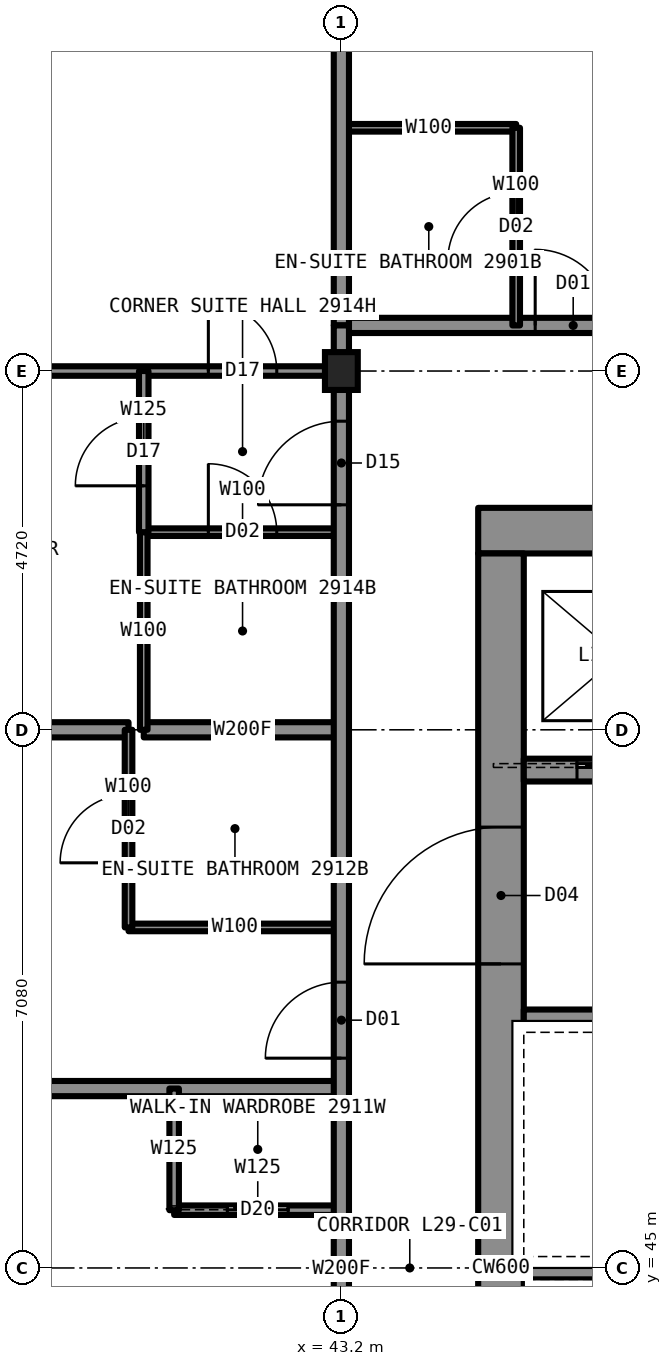
"""IFC4 building model, lengths in metres.
Left out: names, types, materials, properties, quantities, classifications, styles, units other than length and angle.
Written with IfcOpenShell. Run it as: python <this file> out.ifc"""

import sys

from ifc_helpers import new_model, si_unit, direction, frame, frame_2d, origin, origin_2d, place, context, subcontext, project, spatial, rectangle, i_section, extrude, element, fill, save


model = new_model("IFC4")
c1 = context("Model", 3, precision=1e-05, world=origin(), true_north=direction((0.0, 1.0)))
c2 = subcontext(c1, "Body", "Model", "MODEL_VIEW")
j1 = project(units=[si_unit("LENGTHUNIT", "METRE"), si_unit("PLANEANGLEUNIT", "RADIAN")], contexts=[c1])
p1 = place(None, origin())
s1 = spatial("IfcSite", under=j1, at=p1, CompositionType="ELEMENT")
p2 = place(p1, origin())
s2 = spatial("IfcBuilding", under=s1, at=p2, CompositionType="ELEMENT")
p3 = place(p2, frame((0.0, 0.0, 103.9)))
s3 = spatial("IfcBuildingStorey", under=s2, at=p3, CompositionType="ELEMENT", Elevation=103.9)
p4 = place(p3, frame((43.2, 56.8, 0.0), z_axis=(0.0, 0.0, 1.0), x_axis=(1.0, 0.0, 0.0)))
e1 = element("IfcColumn", 1, at=p4, inside=s3, PredefinedType="COLUMN", context=c2, shape_type="SweptSolid", body=[
    extrude(i_section(OverallWidth=0.432, OverallDepth=0.498, WebThickness=0.056, FlangeThickness=0.089, at=origin_2d()), origin(), (0.0, 0.0, 1.0), 3.5),
])
p5 = place(p3, frame((45.0, 54.7, 0.0), z_axis=(0.0, 0.0, 1.0), x_axis=(1.0, 0.0, 0.0)))
e2 = element("IfcWall", 2, at=p5, inside=s3, PredefinedType="SHEAR", context=c2, shape_type="SweptSolid", body=[
    extrude(rectangle(XDim=20.0, YDim=0.6, at=frame_2d((10.0, 0.0))), origin(), (0.0, 0.0, 1.0), 3.5),
])
p6 = place(p3, frame((45.3, 35.6, 0.0), z_axis=(0.0, 0.0, 1.0), x_axis=(0.0, 1.0, 0.0)))
e3 = element("IfcWall", 3, at=p6, inside=s3, PredefinedType="SHEAR", context=c2, shape_type="SweptSolid", body=[
    extrude(rectangle(XDim=18.8, YDim=0.6, at=frame_2d((9.4, 0.0))), origin(), (0.0, 0.0, 1.0), 3.5),
])
p7 = place(p6, frame((13.4, 0.0, 0.0)))
e4 = element("IfcOpeningElement", 4, at=p7, cuts=e3, PredefinedType="OPENING", context=c2, shape_type="SweptSolid", body=[
    extrude(rectangle(XDim=1.8, YDim=2.2, at=frame_2d((0.9, 1.1))), frame((0.0, 0.31, 0.0), z_axis=(0.0, -1.0, 0.0), x_axis=(1.0, 0.0, 0.0)), (0.0, 0.0, 1.0), 0.62),
])
p8 = place(p6, frame((3.6, 0.0, 0.0)))
e5 = element("IfcOpeningElement", 5, at=p8, cuts=e3, PredefinedType="OPENING", context=c2, shape_type="SweptSolid", body=[
    extrude(rectangle(XDim=1.8, YDim=2.2, at=frame_2d((0.9, 1.1))), frame((0.0, 0.31, 0.0), z_axis=(0.0, -1.0, 0.0), x_axis=(1.0, 0.0, 0.0)), (0.0, 0.0, 1.0), 0.62),
])
p9 = place(p6, frame((6.4, 0.0, 0.0)))
e6 = element("IfcOpeningElement", 6, at=p9, cuts=e3, PredefinedType="OPENING", context=c2, shape_type="SweptSolid", body=[
    extrude(rectangle(XDim=1.2, YDim=2.2, at=frame_2d((0.6, 1.1))), frame((0.0, 0.31, 0.0), z_axis=(0.0, -1.0, 0.0), x_axis=(1.0, 0.0, 0.0)), (0.0, 0.0, 1.0), 0.62),
])
p10 = place(p3, frame((45.6, 51.55, 0.0), z_axis=(0.0, 0.0, 1.0), x_axis=(1.0, 0.0, 0.0)))
e7 = element("IfcWall", 7, at=p10, inside=s3, PredefinedType="SHEAR", context=c2, shape_type="SweptSolid", body=[
    extrude(rectangle(XDim=18.8, YDim=0.3, at=frame_2d((9.4, 0.0))), origin(), (0.0, 0.0, 1.0), 3.5),
])
p11 = place(p10, frame((0.7, 0.0, 0.0)))
e8 = element("IfcOpeningElement", 8, at=p11, cuts=e7, PredefinedType="OPENING", context=c2, shape_type="SweptSolid", body=[
    extrude(rectangle(XDim=1.1, YDim=2.2, at=frame_2d((0.55, 1.1))), frame((0.0, 0.16, 0.0), z_axis=(0.0, -1.0, 0.0), x_axis=(1.0, 0.0, 0.0)), (0.0, 0.0, 1.0), 0.32),
])
p12 = place(p10, frame((3.4, 0.0, 0.0)))
e9 = element("IfcOpeningElement", 9, at=p12, cuts=e7, PredefinedType="OPENING", context=c2, shape_type="SweptSolid", body=[
    extrude(rectangle(XDim=1.1, YDim=2.2, at=frame_2d((0.55, 1.1))), frame((0.0, 0.16, 0.0), z_axis=(0.0, -1.0, 0.0), x_axis=(1.0, 0.0, 0.0)), (0.0, 0.0, 1.0), 0.32),
])
p13 = place(p10, frame((6.1, 0.0, 0.0)))
e10 = element("IfcOpeningElement", 10, at=p13, cuts=e7, PredefinedType="OPENING", context=c2, shape_type="SweptSolid", body=[
    extrude(rectangle(XDim=1.1, YDim=2.2, at=frame_2d((0.55, 1.1))), frame((0.0, 0.16, 0.0), z_axis=(0.0, -1.0, 0.0), x_axis=(1.0, 0.0, 0.0)), (0.0, 0.0, 1.0), 0.32),
])
p14 = place(p10, frame((8.8, 0.0, 0.0)))
e11 = element("IfcOpeningElement", 11, at=p14, cuts=e7, PredefinedType="OPENING", context=c2, shape_type="SweptSolid", body=[
    extrude(rectangle(XDim=1.1, YDim=2.2, at=frame_2d((0.55, 1.1))), frame((0.0, 0.16, 0.0), z_axis=(0.0, -1.0, 0.0), x_axis=(1.0, 0.0, 0.0)), (0.0, 0.0, 1.0), 0.32),
])
p15 = place(p10, frame((11.6, 0.0, 0.0)))
e12 = element("IfcOpeningElement", 12, at=p15, cuts=e7, PredefinedType="OPENING", context=c2, shape_type="SweptSolid", body=[
    extrude(rectangle(XDim=1.1, YDim=2.2, at=frame_2d((0.55, 1.1))), frame((0.0, 0.16, 0.0), z_axis=(0.0, -1.0, 0.0), x_axis=(1.0, 0.0, 0.0)), (0.0, 0.0, 1.0), 0.32),
])
p16 = place(p10, frame((14.3, 0.0, 0.0)))
e13 = element("IfcOpeningElement", 13, at=p16, cuts=e7, PredefinedType="OPENING", context=c2, shape_type="SweptSolid", body=[
    extrude(rectangle(XDim=1.1, YDim=2.2, at=frame_2d((0.55, 1.1))), frame((0.0, 0.16, 0.0), z_axis=(0.0, -1.0, 0.0), x_axis=(1.0, 0.0, 0.0)), (0.0, 0.0, 1.0), 0.32),
])
p17 = place(p3, frame((45.6, 48.25, 0.0), z_axis=(0.0, 0.0, 1.0), x_axis=(1.0, 0.0, 0.0)))
e14 = element("IfcWall", 14, at=p17, inside=s3, PredefinedType="SHEAR", context=c2, shape_type="SweptSolid", body=[
    extrude(rectangle(XDim=7.1, YDim=0.3, at=frame_2d((3.55, 0.0))), origin(), (0.0, 0.0, 1.0), 3.5),
])
p18 = place(p3, frame((45.6, 45.0, 0.0), z_axis=(0.0, 0.0, 1.0), x_axis=(1.0, 0.0, 0.0)))
e15 = element("IfcWall", 15, at=p18, inside=s3, PredefinedType="SHEAR", context=c2, shape_type="SweptSolid", body=[
    extrude(rectangle(XDim=6.8, YDim=0.3, at=frame_2d((3.4, 0.0))), origin(), (0.0, 0.0, 1.0), 3.5),
])
p19 = place(p3, frame((41.0, 45.76, 0.0), z_axis=(0.0, 0.0, 1.0), x_axis=(1.0, 0.0, 0.0)))
e16 = element("IfcWall", 16, at=p19, inside=s3, PredefinedType="PARTITIONING", context=c2, shape_type="SweptSolid", body=[
    extrude(rectangle(XDim=2.2, YDim=0.125, at=frame_2d((1.1, 0.0))), origin(), (0.0, 0.0, 1.0), 3.33),
])
p20 = place(p19, frame((0.7, 0.0, 0.0)))
e17 = element("IfcOpeningElement", 17, at=p20, cuts=e16, PredefinedType="OPENING", context=c2, shape_type="SweptSolid", body=[
    extrude(rectangle(XDim=0.8, YDim=2.1, at=frame_2d((0.4, 1.05))), frame((0.0, 0.073, 0.0), z_axis=(0.0, -1.0, 0.0), x_axis=(1.0, 0.0, 0.0)), (0.0, 0.0, 1.0), 0.145),
])
p21 = place(p3, frame((34.7, 56.8, 0.0), z_axis=(0.0, 0.0, 1.0), x_axis=(1.0, 0.0, 0.0)))
e18 = element("IfcWall", 18, at=p21, inside=s3, PredefinedType="PARTITIONING", context=c2, shape_type="SweptSolid", body=[
    extrude(rectangle(XDim=8.5, YDim=0.125, at=frame_2d((4.25, 0.0))), origin(), (0.0, 0.0, 1.0), 2.573),
])
p22 = place(p21, frame((6.75, 0.0, 0.0)))
e19 = element("IfcOpeningElement", 19, at=p22, cuts=e18, PredefinedType="OPENING", context=c2, shape_type="SweptSolid", body=[
    extrude(rectangle(XDim=0.9, YDim=2.2, at=frame_2d((0.45, 1.1))), frame((0.0, 0.073, 0.0), z_axis=(0.0, -1.0, 0.0), x_axis=(1.0, 0.0, 0.0)), (0.0, 0.0, 1.0), 0.145),
])
p23 = place(p3, frame((43.2, 57.4, 0.0), z_axis=(0.0, 0.0, 1.0), x_axis=(1.0, 0.0, 0.0)))
e20 = element("IfcWall", 20, at=p23, inside=s3, PredefinedType="PARTITIONING", context=c2, shape_type="SweptSolid", body=[
    extrude(rectangle(XDim=23.6, YDim=0.2, at=frame_2d((11.8, 0.0))), origin(), (0.0, 0.0, 1.0), 3.33),
])
p24 = place(p23, frame((2.55, 0.0, 0.0)))
e21 = element("IfcOpeningElement", 21, at=p24, cuts=e20, PredefinedType="OPENING", context=c2, shape_type="SweptSolid", body=[
    extrude(rectangle(XDim=1.0, YDim=2.2, at=frame_2d((0.5, 1.1))), frame((0.0, 0.11, 0.0), z_axis=(0.0, -1.0, 0.0), x_axis=(1.0, 0.0, 0.0)), (0.0, 0.0, 1.0), 0.22),
])
p25 = place(p23, frame((7.72, 0.0, 0.0)))
e22 = element("IfcOpeningElement", 22, at=p25, cuts=e20, PredefinedType="OPENING", context=c2, shape_type="SweptSolid", body=[
    extrude(rectangle(XDim=1.0, YDim=2.2, at=frame_2d((0.5, 1.1))), frame((0.0, 0.11, 0.0), z_axis=(0.0, -1.0, 0.0), x_axis=(1.0, 0.0, 0.0)), (0.0, 0.0, 1.0), 0.22),
])
p26 = place(p23, frame((14.56, 0.0, 0.0)))
e23 = element("IfcOpeningElement", 23, at=p26, cuts=e20, PredefinedType="OPENING", context=c2, shape_type="SweptSolid", body=[
    extrude(rectangle(XDim=1.0, YDim=2.2, at=frame_2d((0.5, 1.1))), frame((0.0, 0.11, 0.0), z_axis=(0.0, -1.0, 0.0), x_axis=(1.0, 0.0, 0.0)), (0.0, 0.0, 1.0), 0.22),
])
p27 = place(p23, frame((20.34, 0.0, 0.0)))
e24 = element("IfcOpeningElement", 24, at=p27, cuts=e20, PredefinedType="OPENING", context=c2, shape_type="SweptSolid", body=[
    extrude(rectangle(XDim=1.0, YDim=2.2, at=frame_2d((0.5, 1.1))), frame((0.0, 0.11, 0.0), z_axis=(0.0, -1.0, 0.0), x_axis=(1.0, 0.0, 0.0)), (0.0, 0.0, 1.0), 0.22),
])
p28 = place(p3, frame((43.2, 60.0, 0.0), z_axis=(0.0, 0.0, 1.0), x_axis=(1.0, 0.0, 0.0)))
e25 = element("IfcWall", 25, at=p28, inside=s3, PredefinedType="PARTITIONING", context=c2, shape_type="SweptSolid", body=[
    extrude(rectangle(XDim=2.3, YDim=0.1, at=frame_2d((1.15, 0.0))), origin(), (0.0, 0.0, 1.0), 2.731),
])
p29 = place(p3, frame((34.7, 47.36, 0.0), z_axis=(0.0, 0.0, 1.0), x_axis=(1.0, 0.0, 0.0)))
e26 = element("IfcWall", 26, at=p29, inside=s3, PredefinedType="PARTITIONING", context=c2, shape_type="SweptSolid", body=[
    extrude(rectangle(XDim=8.5, YDim=0.2, at=frame_2d((4.25, 0.0))), origin(), (0.0, 0.0, 1.0), 2.731),
])
p30 = place(p3, frame((40.4, 49.48, 0.0), z_axis=(0.0, 0.0, 1.0), x_axis=(1.0, 0.0, 0.0)))
e27 = element("IfcWall", 27, at=p30, inside=s3, PredefinedType="PARTITIONING", context=c2, shape_type="SweptSolid", body=[
    extrude(rectangle(XDim=2.8, YDim=0.1, at=frame_2d((1.4, 0.0))), origin(), (0.0, 0.0, 1.0), 3.33),
])
p31 = place(p3, frame((34.7, 52.08, 0.0), z_axis=(0.0, 0.0, 1.0), x_axis=(1.0, 0.0, 0.0)))
e28 = element("IfcWall", 28, at=p31, inside=s3, PredefinedType="PARTITIONING", context=c2, shape_type="SweptSolid", body=[
    extrude(rectangle(XDim=5.7, YDim=0.2, at=frame_2d((2.85, 0.0))), origin(), (0.0, 0.0, 1.0), 2.573),
])
p32 = place(p3, frame((40.6, 52.08, 0.0), z_axis=(0.0, 0.0, 1.0), x_axis=(1.0, 0.0, 0.0)))
e29 = element("IfcWall", 29, at=p32, inside=s3, PredefinedType="PARTITIONING", context=c2, shape_type="SweptSolid", body=[
    extrude(rectangle(XDim=2.6, YDim=0.2, at=frame_2d((1.3, 0.0))), origin(), (0.0, 0.0, 1.0), 2.573),
])
p33 = place(p3, frame((40.6, 54.68, 0.0), z_axis=(0.0, 0.0, 1.0), x_axis=(1.0, 0.0, 0.0)))
e30 = element("IfcWall", 30, at=p33, inside=s3, PredefinedType="PARTITIONING", context=c2, shape_type="SweptSolid", body=[
    extrude(rectangle(XDim=2.6, YDim=0.1, at=frame_2d((1.3, 0.0))), origin(), (0.0, 0.0, 1.0), 3.33),
])
p34 = place(p33, frame((0.85, 0.0, 0.0)))
e31 = element("IfcOpeningElement", 31, at=p34, cuts=e30, PredefinedType="OPENING", context=c2, shape_type="SweptSolid", body=[
    extrude(rectangle(XDim=0.9, YDim=2.1, at=frame_2d((0.45, 1.05))), frame((0.0, 0.06, 0.0), z_axis=(0.0, -1.0, 0.0), x_axis=(1.0, 0.0, 0.0)), (0.0, 0.0, 1.0), 0.12),
])
p35 = place(p3, frame((43.2, 33.2, 0.0), z_axis=(0.0, 0.0, 1.0), x_axis=(0.0, 1.0, 0.0)))
e32 = element("IfcWall", 32, at=p35, inside=s3, PredefinedType="PARTITIONING", context=c2, shape_type="SweptSolid", body=[
    extrude(rectangle(XDim=23.58, YDim=0.2, at=frame_2d((11.79, 0.0))), origin(), (0.0, 0.0, 1.0), 3.33),
])
p36 = place(p35, frame((7.72, 0.0, 0.0)))
e33 = element("IfcOpeningElement", 33, at=p36, cuts=e32, PredefinedType="OPENING", context=c2, shape_type="SweptSolid", body=[
    extrude(rectangle(XDim=1.0, YDim=2.2, at=frame_2d((0.5, 1.1))), frame((0.0, 0.11, 0.0), z_axis=(0.0, -1.0, 0.0), x_axis=(1.0, 0.0, 0.0)), (0.0, 0.0, 1.0), 0.22),
])
p37 = place(p35, frame((14.56, 0.0, 0.0)))
e34 = element("IfcOpeningElement", 34, at=p37, cuts=e32, PredefinedType="OPENING", context=c2, shape_type="SweptSolid", body=[
    extrude(rectangle(XDim=1.0, YDim=2.2, at=frame_2d((0.5, 1.1))), frame((0.0, 0.11, 0.0), z_axis=(0.0, -1.0, 0.0), x_axis=(1.0, 0.0, 0.0)), (0.0, 0.0, 1.0), 0.22),
])
p38 = place(p35, frame((21.84, 0.0, 0.0)))
e35 = element("IfcOpeningElement", 35, at=p38, cuts=e32, PredefinedType="OPENING", context=c2, shape_type="SweptSolid", body=[
    extrude(rectangle(XDim=1.1, YDim=2.2, at=frame_2d((0.55, 1.1))), frame((0.0, 0.11, 0.0), z_axis=(0.0, -1.0, 0.0), x_axis=(1.0, 0.0, 0.0)), (0.0, 0.0, 1.0), 0.22),
])
p39 = place(p35, frame((0.66, 0.0, 0.0)))
e36 = element("IfcOpeningElement", 36, at=p39, cuts=e32, PredefinedType="OPENING", context=c2, shape_type="SweptSolid", body=[
    extrude(rectangle(XDim=1.1, YDim=2.2, at=frame_2d((0.55, 1.1))), frame((0.0, 0.11, 0.0), z_axis=(0.0, -1.0, 0.0), x_axis=(1.0, 0.0, 0.0)), (0.0, 0.0, 1.0), 0.22),
])
p40 = place(p3, frame((43.2, 57.4, 0.0), z_axis=(0.0, 0.0, 1.0), x_axis=(0.0, 1.0, 0.0)))
e37 = element("IfcWall", 37, at=p40, inside=s3, PredefinedType="PARTITIONING", context=c2, shape_type="SweptSolid", body=[
    extrude(rectangle(XDim=7.9, YDim=0.2, at=frame_2d((3.95, 0.0))), origin(), (0.0, 0.0, 1.0), 2.573),
])
p41 = place(p3, frame((41.0, 45.76, 0.0), z_axis=(0.0, 0.0, 1.0), x_axis=(0.0, 1.0, 0.0)))
e38 = element("IfcWall", 38, at=p41, inside=s3, PredefinedType="PARTITIONING", context=c2, shape_type="SweptSolid", body=[
    extrude(rectangle(XDim=1.6, YDim=0.125, at=frame_2d((0.8, 0.0))), origin(), (0.0, 0.0, 1.0), 3.33),
])
p42 = place(p3, frame((40.6, 52.08, 0.0), z_axis=(0.0, 0.0, 1.0), x_axis=(0.0, 1.0, 0.0)))
e39 = element("IfcWall", 39, at=p42, inside=s3, PredefinedType="PARTITIONING", context=c2, shape_type="SweptSolid", body=[
    extrude(rectangle(XDim=2.6, YDim=0.1, at=frame_2d((1.3, 0.0))), origin(), (0.0, 0.0, 1.0), 3.33),
])
p43 = place(p3, frame((40.6, 54.68, 0.0), z_axis=(0.0, 0.0, 1.0), x_axis=(0.0, 1.0, 0.0)))
e40 = element("IfcWall", 40, at=p43, inside=s3, PredefinedType="PARTITIONING", context=c2, shape_type="SweptSolid", body=[
    extrude(rectangle(XDim=2.12, YDim=0.125, at=frame_2d((1.06, 0.0))), origin(), (0.0, 0.0, 1.0), 3.33),
])
p44 = place(p43, frame((0.61, 0.0, 0.0)))
e41 = element("IfcOpeningElement", 41, at=p44, cuts=e40, PredefinedType="OPENING", context=c2, shape_type="SweptSolid", body=[
    extrude(rectangle(XDim=0.9, YDim=2.2, at=frame_2d((0.45, 1.1))), frame((0.0, 0.073, 0.0), z_axis=(0.0, -1.0, 0.0), x_axis=(1.0, 0.0, 0.0)), (0.0, 0.0, 1.0), 0.145),
])
p45 = place(p3, frame((40.4, 49.48, 0.0), z_axis=(0.0, 0.0, 1.0), x_axis=(0.0, 1.0, 0.0)))
e42 = element("IfcWall", 42, at=p45, inside=s3, PredefinedType="PARTITIONING", context=c2, shape_type="SweptSolid", body=[
    extrude(rectangle(XDim=2.6, YDim=0.1, at=frame_2d((1.3, 0.0))), origin(), (0.0, 0.0, 1.0), 3.33),
])
p46 = place(p45, frame((0.85, 0.0, 0.0)))
e43 = element("IfcOpeningElement", 43, at=p46, cuts=e42, PredefinedType="OPENING", context=c2, shape_type="SweptSolid", body=[
    extrude(rectangle(XDim=0.9, YDim=2.1, at=frame_2d((0.45, 1.05))), frame((0.0, 0.06, 0.0), z_axis=(0.0, -1.0, 0.0), x_axis=(1.0, 0.0, 0.0)), (0.0, 0.0, 1.0), 0.12),
])
p47 = place(p3, frame((45.5, 57.4, 0.0), z_axis=(0.0, 0.0, 1.0), x_axis=(0.0, 1.0, 0.0)))
e44 = element("IfcWall", 44, at=p47, inside=s3, PredefinedType="PARTITIONING", context=c2, shape_type="SweptSolid", body=[
    extrude(rectangle(XDim=2.6, YDim=0.1, at=frame_2d((1.3, 0.0))), origin(), (0.0, 0.0, 1.0), 3.33),
])
p48 = place(p47, frame((0.85, 0.0, 0.0)))
e45 = element("IfcOpeningElement", 45, at=p48, cuts=e44, PredefinedType="OPENING", context=c2, shape_type="SweptSolid", body=[
    extrude(rectangle(XDim=0.9, YDim=2.1, at=frame_2d((0.45, 1.05))), frame((0.0, 0.06, 0.0), z_axis=(0.0, -1.0, 0.0), x_axis=(1.0, 0.0, 0.0)), (0.0, 0.0, 1.0), 0.12),
])
p49 = place(p3, frame((43.2, 56.78, 0.0), z_axis=(0.0, 0.0, 1.0), x_axis=(0.0, 1.0, 0.0)))
e46 = element("IfcWall", 46, at=p49, inside=s3, PredefinedType="PARTITIONING", context=c2, shape_type="SweptSolid", body=[
    extrude(rectangle(XDim=0.62, YDim=0.2, at=frame_2d((0.31, 0.0))), origin(), (0.0, 0.0, 1.0), 2.573),
])
p50 = place(p24, origin())
e47 = element("IfcDoor", 47, at=p50, inside=s3, OperationType="SINGLE_SWING_LEFT", PredefinedType="DOOR", context=c2, shape_type="SweptSolid", body=[
    extrude(rectangle(XDim=1.0, YDim=2.2, at=frame_2d((0.5, 1.1))), frame((0.0, 0.025, 0.0), z_axis=(0.0, -1.0, 0.0), x_axis=(1.0, 0.0, 0.0)), (0.0, 0.0, 1.0), 0.05),
])
fill(e21, e47)
p51 = place(p48, origin())
e48 = element("IfcDoor", 48, at=p51, inside=s3, OperationType="SINGLE_SWING_RIGHT", PredefinedType="DOOR", context=c2, shape_type="SweptSolid", body=[
    extrude(rectangle(XDim=0.9, YDim=2.1, at=frame_2d((0.45, 1.05))), frame((0.0, 0.025, 0.0), z_axis=(0.0, -1.0, 0.0), x_axis=(1.0, 0.0, 0.0)), (0.0, 0.0, 1.0), 0.05),
])
fill(e45, e48)
p52 = place(p20, origin())
e49 = element("IfcDoor", 49, at=p52, inside=s3, OperationType="SLIDING_TO_LEFT", PredefinedType="DOOR", context=c2, shape_type="SweptSolid", body=[
    extrude(rectangle(XDim=0.8, YDim=2.1, at=frame_2d((0.4, 1.05))), frame((0.0, 0.025, 0.0), z_axis=(0.0, -1.0, 0.0), x_axis=(1.0, 0.0, 0.0)), (0.0, 0.0, 1.0), 0.05),
])
fill(e17, e49)
p53 = place(p37, origin())
e50 = element("IfcDoor", 50, at=p53, inside=s3, OperationType="SINGLE_SWING_LEFT", PredefinedType="DOOR", context=c2, shape_type="SweptSolid", body=[
    extrude(rectangle(XDim=1.0, YDim=2.2, at=frame_2d((0.5, 1.1))), frame((0.0, 0.025, 0.0), z_axis=(0.0, -1.0, 0.0), x_axis=(1.0, 0.0, 0.0)), (0.0, 0.0, 1.0), 0.05),
])
fill(e34, e50)
p54 = place(p46, origin())
e51 = element("IfcDoor", 51, at=p54, inside=s3, OperationType="SINGLE_SWING_RIGHT", PredefinedType="DOOR", context=c2, shape_type="SweptSolid", body=[
    extrude(rectangle(XDim=0.9, YDim=2.1, at=frame_2d((0.45, 1.05))), frame((0.0, 0.025, 0.0), z_axis=(0.0, -1.0, 0.0), x_axis=(1.0, 0.0, 0.0)), (0.0, 0.0, 1.0), 0.05),
])
fill(e43, e51)
p55 = place(p22, origin())
e52 = element("IfcDoor", 52, at=p55, inside=s3, OperationType="SINGLE_SWING_LEFT", PredefinedType="DOOR", context=c2, shape_type="SweptSolid", body=[
    extrude(rectangle(XDim=0.9, YDim=2.2, at=frame_2d((0.45, 1.1))), frame((0.0, 0.025, 0.0), z_axis=(0.0, -1.0, 0.0), x_axis=(1.0, 0.0, 0.0)), (0.0, 0.0, 1.0), 0.05),
])
fill(e19, e52)
p56 = place(p34, origin())
e53 = element("IfcDoor", 53, at=p56, inside=s3, OperationType="SINGLE_SWING_RIGHT", PredefinedType="DOOR", context=c2, shape_type="SweptSolid", body=[
    extrude(rectangle(XDim=0.9, YDim=2.1, at=frame_2d((0.45, 1.05))), frame((0.0, 0.025, 0.0), z_axis=(0.0, -1.0, 0.0), x_axis=(1.0, 0.0, 0.0)), (0.0, 0.0, 1.0), 0.05),
])
fill(e31, e53)
p57 = place(p38, origin())
e54 = element("IfcDoor", 54, at=p57, inside=s3, OperationType="SINGLE_SWING_LEFT", PredefinedType="DOOR", context=c2, shape_type="SweptSolid", body=[
    extrude(rectangle(XDim=1.1, YDim=2.2, at=frame_2d((0.55, 1.1))), frame((0.0, 0.025, 0.0), z_axis=(0.0, -1.0, 0.0), x_axis=(1.0, 0.0, 0.0)), (0.0, 0.0, 1.0), 0.05),
])
fill(e35, e54)
p58 = place(p44, origin())
e55 = element("IfcDoor", 55, at=p58, inside=s3, OperationType="SINGLE_SWING_LEFT", PredefinedType="DOOR", context=c2, shape_type="SweptSolid", body=[
    extrude(rectangle(XDim=0.9, YDim=2.2, at=frame_2d((0.45, 1.1))), frame((0.0, 0.025, 0.0), z_axis=(0.0, -1.0, 0.0), x_axis=(1.0, 0.0, 0.0)), (0.0, 0.0, 1.0), 0.05),
])
fill(e41, e55)
p59 = place(p7, origin())
e56 = element("IfcDoor", 56, at=p59, inside=s3, OperationType="DOUBLE_DOOR_SINGLE_SWING", PredefinedType="DOOR", context=c2, shape_type="SweptSolid", body=[
    extrude(rectangle(XDim=1.8, YDim=2.2, at=frame_2d((0.9, 1.1))), frame((0.0, 0.025, 0.0), z_axis=(0.0, -1.0, 0.0), x_axis=(1.0, 0.0, 0.0)), (0.0, 0.0, 1.0), 0.05),
])
fill(e4, e56)
p60 = place(p11, origin())
e57 = element("IfcDoor", 57, at=p60, inside=s3, OperationType="SLIDING_TO_LEFT", PredefinedType="DOOR", context=c2, shape_type="SweptSolid", body=[
    extrude(rectangle(XDim=1.1, YDim=2.2, at=frame_2d((0.55, 1.1))), frame((0.0, 0.025, 0.0), z_axis=(0.0, -1.0, 0.0), x_axis=(1.0, 0.0, 0.0)), (0.0, 0.0, 1.0), 0.05),
])
fill(e8, e57)
save(model, sys.argv[1])
